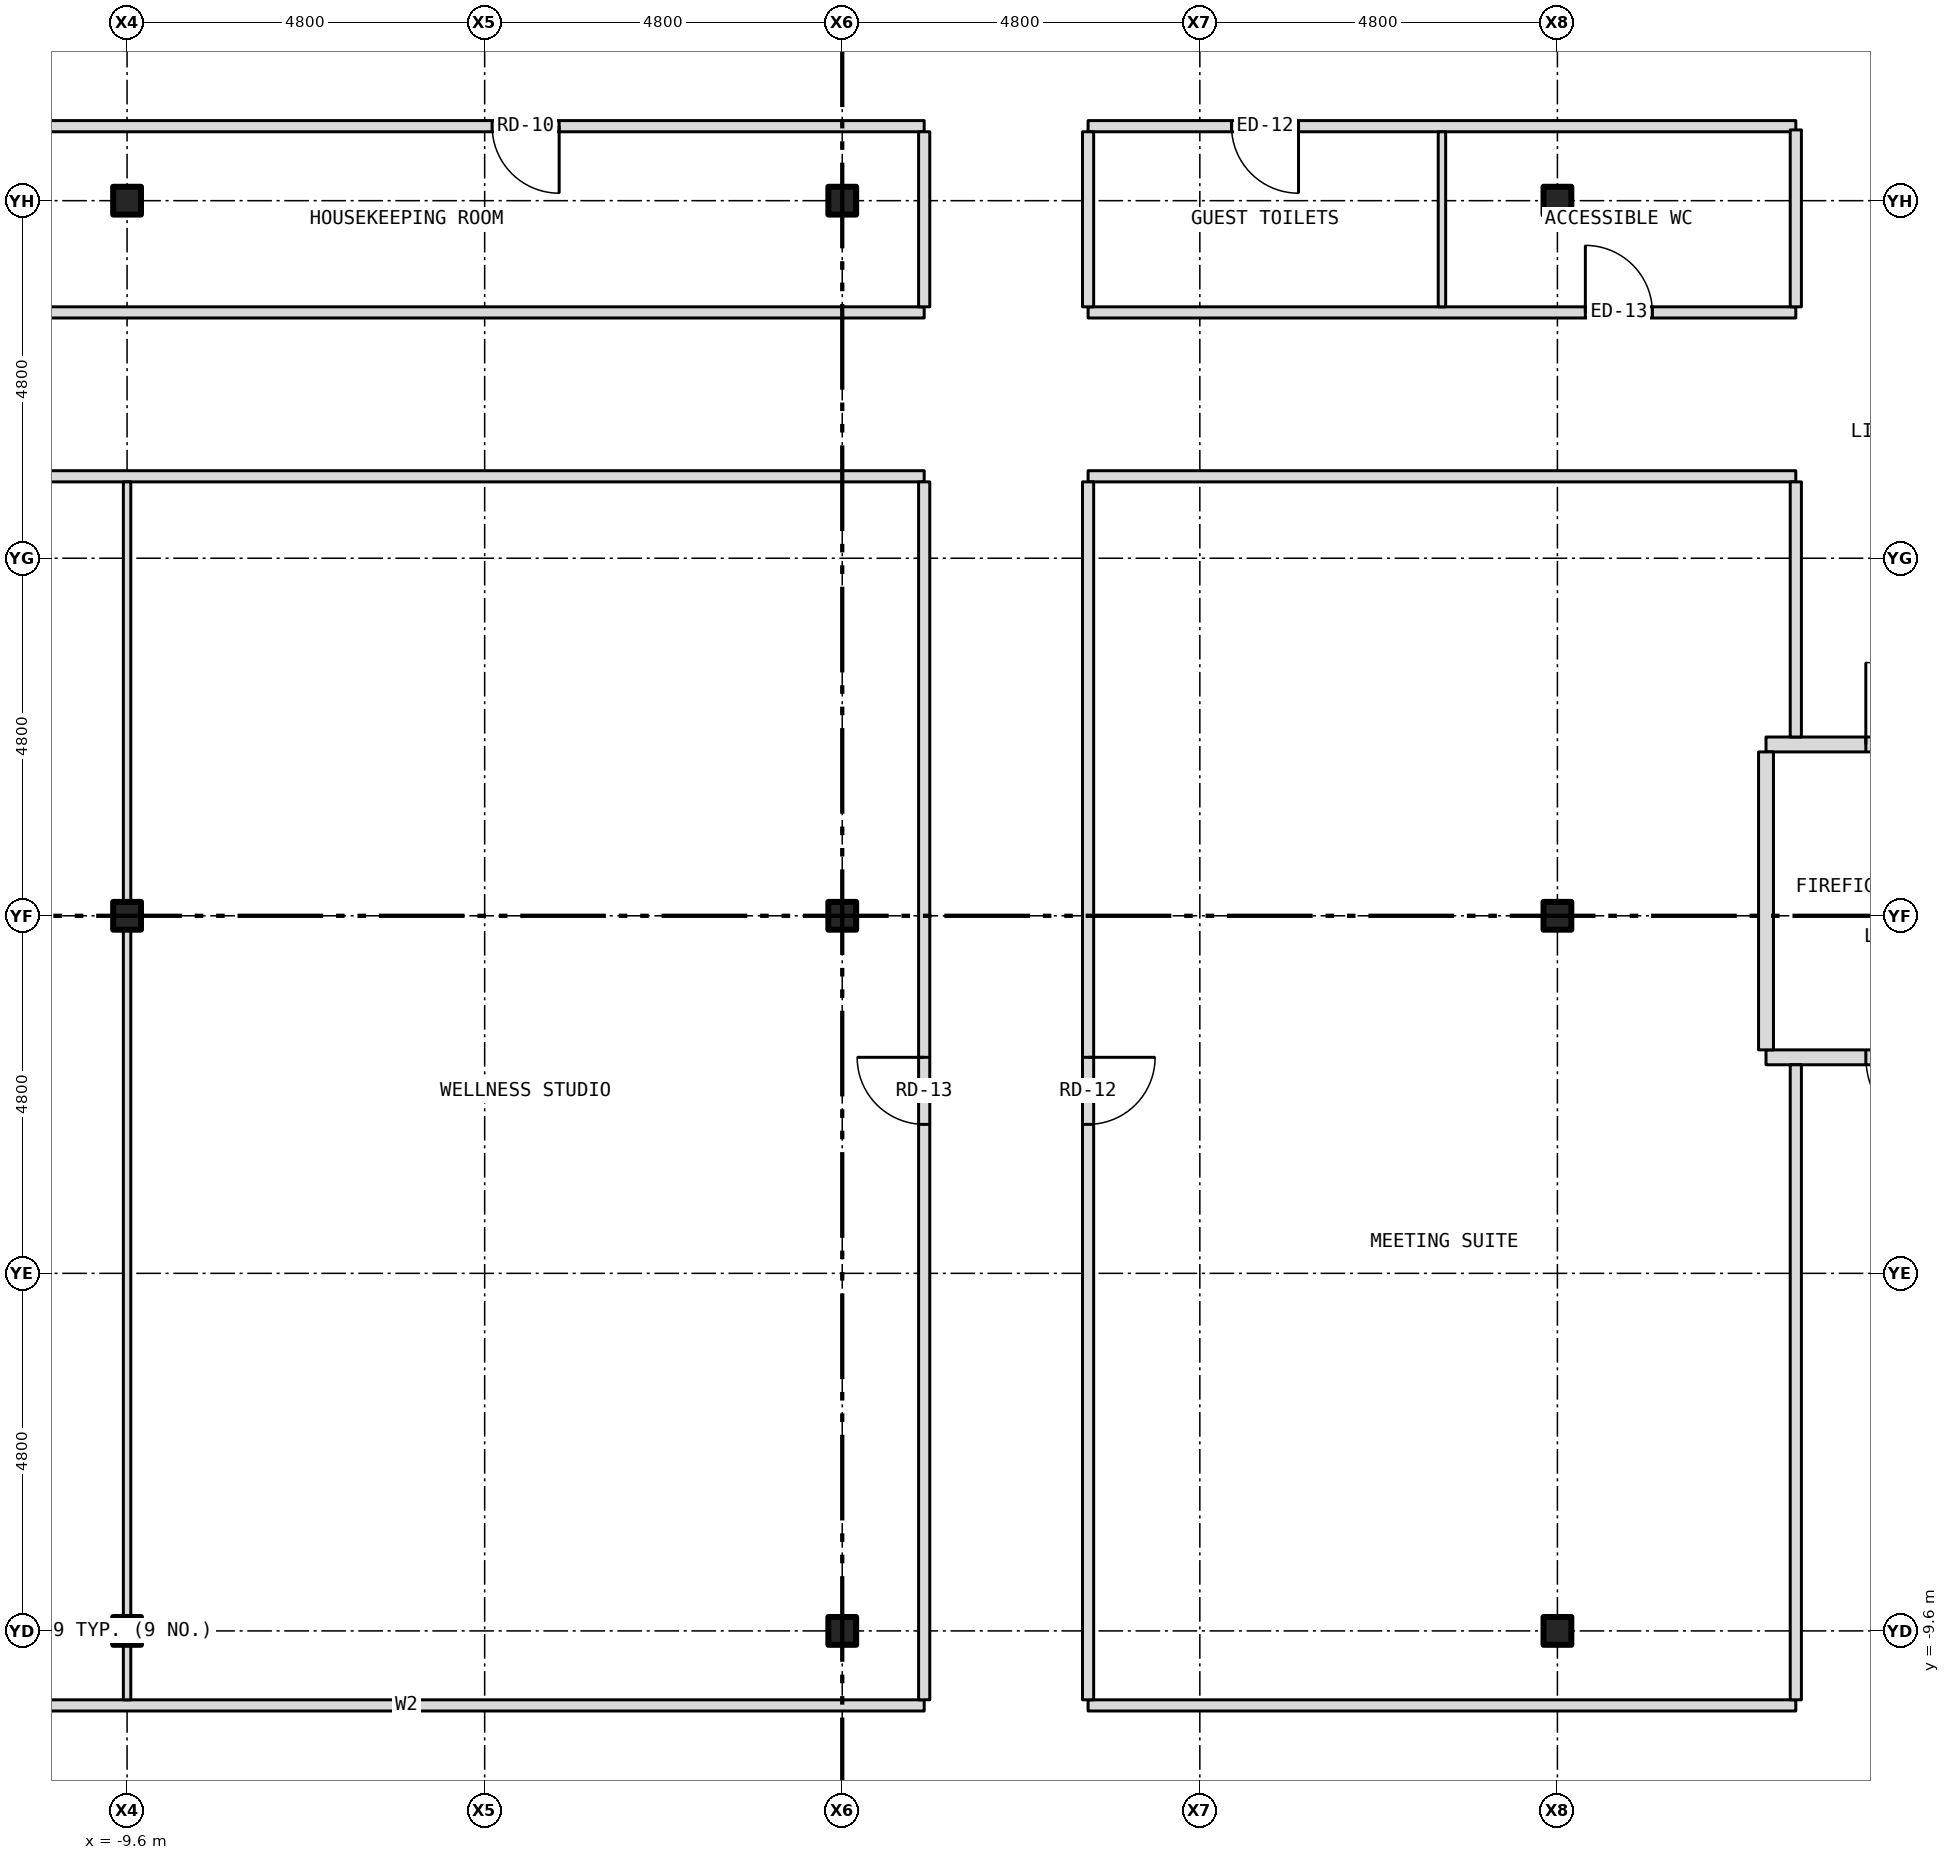
"""IFC4 building model, lengths in metres.
Left out: names, types, materials, properties, quantities, classifications, styles, units other than length and angle.
Written with IfcOpenShell. Run it as: python <this file> out.ifc"""

import sys

from ifc_helpers import new_model, si_unit, direction, frame, frame_2d, origin, origin_2d, place, context, subcontext, project, spatial, rectangle, i_section, extrude, element, fill, save


model = new_model("IFC4")
c1 = context("Model", 3, precision=1e-05, world=origin(), true_north=direction((0.0, 1.0)))
c2 = subcontext(c1, "Body", "Model", "MODEL_VIEW")
j1 = project(units=[si_unit("LENGTHUNIT", "METRE"), si_unit("PLANEANGLEUNIT", "RADIAN")], contexts=[c1])
p1 = place(None, origin())
s1 = spatial("IfcSite", under=j1, at=p1, CompositionType="ELEMENT")
p2 = place(p1, origin())
s2 = spatial("IfcBuilding", under=s1, at=p2, CompositionType="ELEMENT")
p3 = place(p2, frame((0.0, 0.0, 212.0)))
s3 = spatial("IfcBuildingStorey", under=s2, at=p3, CompositionType="ELEMENT", Elevation=212.0)
for number, where, z_axis, x_axis in (
    (1, (-9.6, -9.6, -0.15), (0.0, 0.0, 1.0), (1.0, 0.0, 0.0)),
    (2, (-9.6, 0.0, -0.15), (0.0, 0.0, 1.0), (1.0, 0.0, 0.0)),
    (3, (-9.6, 9.6, -0.15), (0.0, 0.0, 1.0), (1.0, 0.0, 0.0)),
    (4, (0.0, -9.6, -0.15), (0.0, 0.0, 1.0), (1.0, 0.0, 0.0)),
    (5, (0.0, 0.0, -0.15), (0.0, 0.0, 1.0), (1.0, 0.0, 0.0)),
    (6, (0.0, 9.6, -0.15), (0.0, 0.0, 1.0), (1.0, 0.0, 0.0)),
    (7, (9.6, -9.6, -0.15), (0.0, 0.0, 1.0), (1.0, 0.0, 0.0)),
    (8, (9.6, 0.0, -0.15), (0.0, 0.0, 1.0), (1.0, 0.0, 0.0)),
    (9, (9.6, 9.6, -0.15), (0.0, 0.0, 1.0), (1.0, 0.0, 0.0)),
):
    element("IfcColumn", number, at=place(p3, frame(where, z_axis=z_axis, x_axis=x_axis)), inside=s3, PredefinedType="COLUMN", context=c2, shape_type="SweptSolid", body=[
        extrude(i_section(OverallWidth=0.373, OverallDepth=0.373, WebThickness=0.016, FlangeThickness=0.026, at=origin_2d()), origin(), (0.0, 0.0, 1.0), 3.5),
    ])
p4 = place(p3, frame((-12.8, -10.6, 0.0), z_axis=(0.0, 0.0, 1.0), x_axis=(1.0, 0.0, 0.0)))
e10 = element("IfcWall", 10, at=p4, inside=s3, PredefinedType="PARTITIONING", context=c2, shape_type="SweptSolid", body=[
    extrude(rectangle(XDim=13.9, YDim=0.15, at=frame_2d((6.95, 0.0))), origin(), (0.0, 0.0, 1.0), 3.35),
])
p5 = place(p3, frame((3.3, -10.6, 0.0), z_axis=(0.0, 0.0, 1.0), x_axis=(1.0, 0.0, 0.0)))
e11 = element("IfcWall", 11, at=p5, inside=s3, PredefinedType="PARTITIONING", context=c2, shape_type="SweptSolid", body=[
    extrude(rectangle(XDim=9.5, YDim=0.15, at=frame_2d((4.75, 0.0))), origin(), (0.0, 0.0, 1.0), 3.35),
])
p6 = place(p3, frame((12.4, -1.9, 0.0), z_axis=(0.0, 0.0, 1.0), x_axis=(1.0, 0.0, 0.0)))
e12 = element("IfcWall", 12, at=p6, inside=s3, PredefinedType="PARTITIONING", context=c2, shape_type="SweptSolid", body=[
    extrude(rectangle(XDim=3.28, YDim=0.2, at=frame_2d((1.64, 0.0))), origin(), (0.0, 0.0, 1.0), 3.35),
])
p7 = place(p6, frame((1.34, 0.0, 0.0)))
e13 = element("IfcOpeningElement", 13, at=p7, cuts=e12, PredefinedType="OPENING", context=c2, shape_type="SweptSolid", body=[
    extrude(rectangle(XDim=1.1, YDim=2.1, at=frame_2d((0.55, 1.05))), frame((0.0, 0.112, 0.0), z_axis=(0.0, -1.0, 0.0), x_axis=(1.0, 0.0, 0.0)), (0.0, 0.0, 1.0), 0.224),
])
p8 = place(p3, frame((12.4, 2.3, 0.0), z_axis=(0.0, 0.0, 1.0), x_axis=(1.0, 0.0, 0.0)))
e14 = element("IfcWall", 14, at=p8, inside=s3, PredefinedType="PARTITIONING", context=c2, shape_type="SweptSolid", body=[
    extrude(rectangle(XDim=3.28, YDim=0.2, at=frame_2d((1.64, 0.0))), origin(), (0.0, 0.0, 1.0), 3.35),
])
p9 = place(p8, frame((1.34, 0.0, 0.0)))
e15 = element("IfcOpeningElement", 15, at=p9, cuts=e14, PredefinedType="OPENING", context=c2, shape_type="SweptSolid", body=[
    extrude(rectangle(XDim=1.1, YDim=2.1, at=frame_2d((0.55, 1.05))), frame((0.0, 0.112, 0.0), z_axis=(0.0, -1.0, 0.0), x_axis=(1.0, 0.0, 0.0)), (0.0, 0.0, 1.0), 0.224),
])
p10 = place(p3, frame((-12.8, 5.9, 0.0), z_axis=(0.0, 0.0, 1.0), x_axis=(1.0, 0.0, 0.0)))
e16 = element("IfcWall", 16, at=p10, inside=s3, PredefinedType="PARTITIONING", context=c2, shape_type="SweptSolid", body=[
    extrude(rectangle(XDim=13.9, YDim=0.15, at=frame_2d((6.95, 0.0))), origin(), (0.0, 0.0, 1.0), 3.35),
])
p11 = place(p3, frame((3.3, 5.9, 0.0), z_axis=(0.0, 0.0, 1.0), x_axis=(1.0, 0.0, 0.0)))
e17 = element("IfcWall", 17, at=p11, inside=s3, PredefinedType="PARTITIONING", context=c2, shape_type="SweptSolid", body=[
    extrude(rectangle(XDim=9.5, YDim=0.15, at=frame_2d((4.75, 0.0))), origin(), (0.0, 0.0, 1.0), 3.35),
])
p12 = place(p3, frame((-12.8, 8.1, 0.0), z_axis=(0.0, 0.0, 1.0), x_axis=(1.0, 0.0, 0.0)))
e18 = element("IfcWall", 18, at=p12, inside=s3, PredefinedType="PARTITIONING", context=c2, shape_type="SweptSolid", body=[
    extrude(rectangle(XDim=13.9, YDim=0.15, at=frame_2d((6.95, 0.0))), origin(), (0.0, 0.0, 1.0), 3.35),
])
p13 = place(p3, frame((3.3, 8.1, 0.0), z_axis=(0.0, 0.0, 1.0), x_axis=(1.0, 0.0, 0.0)))
e19 = element("IfcWall", 19, at=p13, inside=s3, PredefinedType="PARTITIONING", context=c2, shape_type="SweptSolid", body=[
    extrude(rectangle(XDim=9.5, YDim=0.15, at=frame_2d((4.75, 0.0))), origin(), (0.0, 0.0, 1.0), 3.35),
])
p14 = place(p13, frame((6.675, 0.0, 0.0)))
e20 = element("IfcOpeningElement", 20, at=p14, cuts=e19, PredefinedType="OPENING", context=c2, shape_type="SweptSolid", body=[
    extrude(rectangle(XDim=0.9, YDim=2.1, at=frame_2d((0.45, 1.05))), frame((0.0, 0.087, 0.0), z_axis=(0.0, -1.0, 0.0), x_axis=(1.0, 0.0, 0.0)), (0.0, 0.0, 1.0), 0.174),
])
p15 = place(p3, frame((-12.8, 10.6, 0.0), z_axis=(0.0, 0.0, 1.0), x_axis=(1.0, 0.0, 0.0)))
e21 = element("IfcWall", 21, at=p15, inside=s3, PredefinedType="PARTITIONING", context=c2, shape_type="SweptSolid", body=[
    extrude(rectangle(XDim=13.9, YDim=0.15, at=frame_2d((6.95, 0.0))), origin(), (0.0, 0.0, 1.0), 3.35),
])
p16 = place(p15, frame((8.1, 0.0, 0.0)))
e22 = element("IfcOpeningElement", 22, at=p16, cuts=e21, PredefinedType="OPENING", context=c2, shape_type="SweptSolid", body=[
    extrude(rectangle(XDim=0.9, YDim=2.1, at=frame_2d((0.45, 1.05))), frame((0.0, 0.087, 0.0), z_axis=(0.0, -1.0, 0.0), x_axis=(1.0, 0.0, 0.0)), (0.0, 0.0, 1.0), 0.174),
])
p17 = place(p3, frame((3.3, 10.6, 0.0), z_axis=(0.0, 0.0, 1.0), x_axis=(1.0, 0.0, 0.0)))
e23 = element("IfcWall", 23, at=p17, inside=s3, PredefinedType="PARTITIONING", context=c2, shape_type="SweptSolid", body=[
    extrude(rectangle(XDim=9.5, YDim=0.15, at=frame_2d((4.75, 0.0))), origin(), (0.0, 0.0, 1.0), 3.35),
])
p18 = place(p17, frame((1.925, 0.0, 0.0)))
e24 = element("IfcOpeningElement", 24, at=p18, cuts=e23, PredefinedType="OPENING", context=c2, shape_type="SweptSolid", body=[
    extrude(rectangle(XDim=0.9, YDim=2.1, at=frame_2d((0.45, 1.05))), frame((0.0, 0.087, 0.0), z_axis=(0.0, -1.0, 0.0), x_axis=(1.0, 0.0, 0.0)), (0.0, 0.0, 1.0), 0.174),
])
p19 = place(p3, frame((-9.6, -10.525, 0.0), z_axis=(0.0, 0.0, 1.0), x_axis=(0.0, 1.0, 0.0)))
e25 = element("IfcWall", 25, at=p19, inside=s3, PredefinedType="PARTITIONING", context=c2, shape_type="SweptSolid", body=[
    extrude(rectangle(XDim=0.738, YDim=0.1, at=frame_2d((0.369, 0.0))), origin(), (0.0, 0.0, 1.0), 2.728),
])
p20 = place(p3, frame((-9.6, -9.787, 0.0), z_axis=(0.0, 0.0, 1.0), x_axis=(0.0, 1.0, 0.0)))
e26 = element("IfcWall", 26, at=p20, inside=s3, PredefinedType="PARTITIONING", context=c2, shape_type="SweptSolid", body=[
    extrude(rectangle(XDim=0.374, YDim=0.1, at=frame_2d((0.187, 0.0))), origin(), (0.0, 0.0, 1.0), 3.35),
])
p21 = place(p3, frame((-9.6, -9.413, 0.0), z_axis=(0.0, 0.0, 1.0), x_axis=(0.0, 1.0, 0.0)))
e27 = element("IfcWall", 27, at=p21, inside=s3, PredefinedType="PARTITIONING", context=c2, shape_type="SweptSolid", body=[
    extrude(rectangle(XDim=9.226, YDim=0.1, at=frame_2d((4.613, 0.0))), origin(), (0.0, 0.0, 1.0), 2.728),
])
p22 = place(p3, frame((-9.6, -0.187, 0.0), z_axis=(0.0, 0.0, 1.0), x_axis=(0.0, 1.0, 0.0)))
e28 = element("IfcWall", 28, at=p22, inside=s3, PredefinedType="PARTITIONING", context=c2, shape_type="SweptSolid", body=[
    extrude(rectangle(XDim=0.374, YDim=0.1, at=frame_2d((0.187, 0.0))), origin(), (0.0, 0.0, 1.0), 3.35),
])
p23 = place(p3, frame((-9.6, 0.187, 0.0), z_axis=(0.0, 0.0, 1.0), x_axis=(0.0, 1.0, 0.0)))
e29 = element("IfcWall", 29, at=p23, inside=s3, PredefinedType="PARTITIONING", context=c2, shape_type="SweptSolid", body=[
    extrude(rectangle(XDim=5.638, YDim=0.1, at=frame_2d((2.819, 0.0))), origin(), (0.0, 0.0, 1.0), 2.728),
])
p24 = place(p3, frame((1.1, -10.525, 0.0), z_axis=(0.0, 0.0, 1.0), x_axis=(0.0, 1.0, 0.0)))
e30 = element("IfcWall", 30, at=p24, inside=s3, PredefinedType="PARTITIONING", context=c2, shape_type="SweptSolid", body=[
    extrude(rectangle(XDim=16.35, YDim=0.15, at=frame_2d((8.175, 0.0))), origin(), (0.0, 0.0, 1.0), 3.35),
])
p25 = place(p24, frame((7.725, 0.0, 0.0)))
e31 = element("IfcOpeningElement", 31, at=p25, cuts=e30, PredefinedType="OPENING", context=c2, shape_type="SweptSolid", body=[
    extrude(rectangle(XDim=0.9, YDim=2.1, at=frame_2d((0.45, 1.05))), frame((0.0, 0.087, 0.0), z_axis=(0.0, -1.0, 0.0), x_axis=(1.0, 0.0, 0.0)), (0.0, 0.0, 1.0), 0.174),
])
p26 = place(p3, frame((1.1, 8.175, 0.0), z_axis=(0.0, 0.0, 1.0), x_axis=(0.0, 1.0, 0.0)))
e32 = element("IfcWall", 32, at=p26, inside=s3, PredefinedType="PARTITIONING", context=c2, shape_type="SweptSolid", body=[
    extrude(rectangle(XDim=2.35, YDim=0.15, at=frame_2d((1.175, 0.0))), origin(), (0.0, 0.0, 1.0), 3.35),
])
p27 = place(p3, frame((3.3, -10.525, 0.0), z_axis=(0.0, 0.0, 1.0), x_axis=(0.0, 1.0, 0.0)))
e33 = element("IfcWall", 33, at=p27, inside=s3, PredefinedType="PARTITIONING", context=c2, shape_type="SweptSolid", body=[
    extrude(rectangle(XDim=16.35, YDim=0.15, at=frame_2d((8.175, 0.0))), origin(), (0.0, 0.0, 1.0), 3.35),
])
p28 = place(p27, frame((7.725, 0.0, 0.0)))
e34 = element("IfcOpeningElement", 34, at=p28, cuts=e33, PredefinedType="OPENING", context=c2, shape_type="SweptSolid", body=[
    extrude(rectangle(XDim=0.9, YDim=2.1, at=frame_2d((0.45, 1.05))), frame((0.0, 0.087, 0.0), z_axis=(0.0, -1.0, 0.0), x_axis=(1.0, 0.0, 0.0)), (0.0, 0.0, 1.0), 0.174),
])
p29 = place(p3, frame((3.3, 8.175, 0.0), z_axis=(0.0, 0.0, 1.0), x_axis=(0.0, 1.0, 0.0)))
e35 = element("IfcWall", 35, at=p29, inside=s3, PredefinedType="PARTITIONING", context=c2, shape_type="SweptSolid", body=[
    extrude(rectangle(XDim=2.35, YDim=0.15, at=frame_2d((1.175, 0.0))), origin(), (0.0, 0.0, 1.0), 3.35),
])
p30 = place(p3, frame((8.05, 8.175, 0.0), z_axis=(0.0, 0.0, 1.0), x_axis=(0.0, 1.0, 0.0)))
e36 = element("IfcWall", 36, at=p30, inside=s3, PredefinedType="PARTITIONING", context=c2, shape_type="SweptSolid", body=[
    extrude(rectangle(XDim=2.35, YDim=0.1, at=frame_2d((1.175, 0.0))), origin(), (0.0, 0.0, 1.0), 3.35),
])
p31 = place(p3, frame((12.4, -1.8, 0.0), z_axis=(0.0, 0.0, 1.0), x_axis=(0.0, 1.0, 0.0)))
e37 = element("IfcWall", 37, at=p31, inside=s3, PredefinedType="PARTITIONING", context=c2, shape_type="SweptSolid", body=[
    extrude(rectangle(XDim=4.0, YDim=0.2, at=frame_2d((2.0, 0.0))), origin(), (0.0, 0.0, 1.0), 3.35),
])
p32 = place(p3, frame((12.8, -10.525, 0.0), z_axis=(0.0, 0.0, 1.0), x_axis=(0.0, 1.0, 0.0)))
e38 = element("IfcWall", 38, at=p32, inside=s3, PredefinedType="PARTITIONING", context=c2, shape_type="SweptSolid", body=[
    extrude(rectangle(XDim=8.525, YDim=0.15, at=frame_2d((4.262, 0.0))), origin(), (0.0, 0.0, 1.0), 3.35),
])
p33 = place(p3, frame((12.8, 2.4, 0.0), z_axis=(0.0, 0.0, 1.0), x_axis=(0.0, 1.0, 0.0)))
e39 = element("IfcWall", 39, at=p33, inside=s3, PredefinedType="PARTITIONING", context=c2, shape_type="SweptSolid", body=[
    extrude(rectangle(XDim=3.425, YDim=0.15, at=frame_2d((1.712, 0.0))), origin(), (0.0, 0.0, 1.0), 3.35),
])
p34 = place(p3, frame((12.8, 8.175, 0.0), z_axis=(0.0, 0.0, 1.0), x_axis=(0.0, 1.0, 0.0)))
e40 = element("IfcWall", 40, at=p34, inside=s3, PredefinedType="PARTITIONING", context=c2, shape_type="SweptSolid", body=[
    extrude(rectangle(XDim=2.375, YDim=0.15, at=frame_2d((1.188, 0.0))), origin(), (0.0, 0.0, 1.0), 3.35),
])
p35 = place(p9, origin())
e41 = element("IfcDoor", 41, at=p35, inside=s3, OperationType="SINGLE_SWING_LEFT", PredefinedType="DOOR", context=c2, shape_type="SweptSolid", body=[
    extrude(rectangle(XDim=1.1, YDim=2.1, at=frame_2d((0.55, 1.05))), frame((0.0, 0.025, 0.0), z_axis=(0.0, -1.0, 0.0), x_axis=(1.0, 0.0, 0.0)), (0.0, 0.0, 1.0), 0.05),
])
fill(e15, e41)
p36 = place(p7, origin())
e42 = element("IfcDoor", 42, at=p36, inside=s3, OperationType="SINGLE_SWING_RIGHT", PredefinedType="DOOR", context=c2, shape_type="SweptSolid", body=[
    extrude(rectangle(XDim=1.1, YDim=2.1, at=frame_2d((0.55, 1.05))), frame((0.0, 0.025, 0.0), z_axis=(0.0, -1.0, 0.0), x_axis=(1.0, 0.0, 0.0)), (0.0, 0.0, 1.0), 0.05),
])
fill(e13, e42)
p37 = place(p18, origin())
e43 = element("IfcDoor", 43, at=p37, inside=s3, OperationType="SINGLE_SWING_RIGHT", PredefinedType="DOOR", context=c2, shape_type="SweptSolid", body=[
    extrude(rectangle(XDim=0.9, YDim=2.1, at=frame_2d((0.45, 1.05))), frame((0.0, 0.025, 0.0), z_axis=(0.0, -1.0, 0.0), x_axis=(1.0, 0.0, 0.0)), (0.0, 0.0, 1.0), 0.05),
])
fill(e24, e43)
p38 = place(p14, origin())
e44 = element("IfcDoor", 44, at=p38, inside=s3, OperationType="SINGLE_SWING_LEFT", PredefinedType="DOOR", context=c2, shape_type="SweptSolid", body=[
    extrude(rectangle(XDim=0.9, YDim=2.1, at=frame_2d((0.45, 1.05))), frame((0.0, 0.025, 0.0), z_axis=(0.0, -1.0, 0.0), x_axis=(1.0, 0.0, 0.0)), (0.0, 0.0, 1.0), 0.05),
])
fill(e20, e44)
p39 = place(p16, origin())
e45 = element("IfcDoor", 45, at=p39, inside=s3, OperationType="SINGLE_SWING_RIGHT", PredefinedType="DOOR", context=c2, shape_type="SweptSolid", body=[
    extrude(rectangle(XDim=0.9, YDim=2.1, at=frame_2d((0.45, 1.05))), frame((0.0, 0.025, 0.0), z_axis=(0.0, -1.0, 0.0), x_axis=(1.0, 0.0, 0.0)), (0.0, 0.0, 1.0), 0.05),
])
fill(e22, e45)
p40 = place(p28, origin())
e46 = element("IfcDoor", 46, at=p40, inside=s3, OperationType="SINGLE_SWING_RIGHT", PredefinedType="DOOR", context=c2, shape_type="SweptSolid", body=[
    extrude(rectangle(XDim=0.9, YDim=2.1, at=frame_2d((0.45, 1.05))), frame((0.0, 0.025, 0.0), z_axis=(0.0, -1.0, 0.0), x_axis=(1.0, 0.0, 0.0)), (0.0, 0.0, 1.0), 0.05),
])
fill(e34, e46)
p41 = place(p25, origin())
e47 = element("IfcDoor", 47, at=p41, inside=s3, OperationType="SINGLE_SWING_RIGHT", PredefinedType="DOOR", context=c2, shape_type="SweptSolid", body=[
    extrude(rectangle(XDim=0.9, YDim=2.1, at=frame_2d((0.45, 1.05))), frame((0.0, 0.025, 0.0), z_axis=(0.0, -1.0, 0.0), x_axis=(1.0, 0.0, 0.0)), (0.0, 0.0, 1.0), 0.05),
])
fill(e31, e47)
save(model, sys.argv[1])
